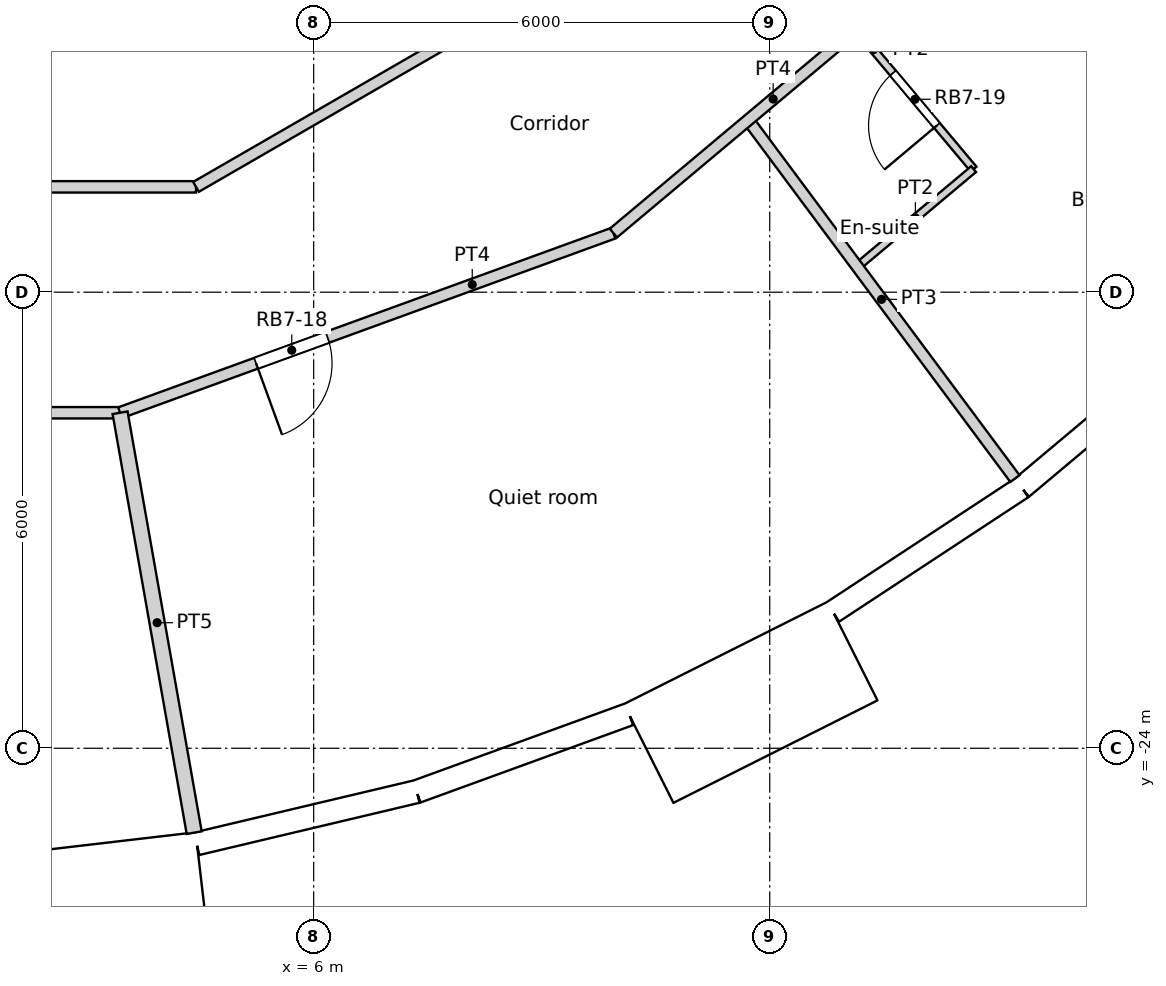
"""IFC4 building model, lengths in metres.
Left out: names, types, materials, properties, quantities, classifications, styles, units other than length and angle.
Written with IfcOpenShell. Run it as: python <this file> out.ifc"""

import sys

from ifc_helpers import new_model, si_unit, direction, frame, frame_2d, origin, origin_2d, place, context, subcontext, project, spatial, rectangle, circle, extrude, element, fill, save


model = new_model("IFC4")
c1 = context("Model", 3, precision=1e-05, world=origin(), true_north=direction((0.0, 1.0)))
c2 = subcontext(c1, "Body", "Model", "MODEL_VIEW")
j1 = project(units=[si_unit("LENGTHUNIT", "METRE"), si_unit("PLANEANGLEUNIT", "RADIAN")], contexts=[c1])
p1 = place(None, origin())
s1 = spatial("IfcSite", under=j1, at=p1, CompositionType="ELEMENT")
p2 = place(p1, origin())
s2 = spatial("IfcBuilding", under=s1, at=p2, CompositionType="ELEMENT")
p3 = place(p2, frame((0.0, 0.0, 190.8)))
s3 = spatial("IfcBuildingStorey", under=s2, at=p3, CompositionType="ELEMENT", Elevation=190.8)
for number, where, z_axis, x_axis in (
    (1, (4.263, -24.175, 0.0), (0.0, 0.0, 1.0), (1.0, 0.0, 0.0)),
    (2, (9.723, -22.54, 0.0), (0.0, 0.0, 1.0), (1.0, 0.0, 0.0)),
    (3, (14.659, -19.69, 0.0), (0.0, 0.0, 1.0), (1.0, 0.0, 0.0)),
):
    element("IfcColumn", number, at=place(p3, frame(where, z_axis=z_axis, x_axis=x_axis)), inside=s3, PredefinedType="COLUMN", context=c2, shape_type="SweptSolid", body=[
        extrude(circle(Radius=0.6, at=origin_2d()), origin(), (0.0, 0.0, 1.0), 3.6),
    ])
for number, where, z_axis, x_axis in (
    (4, (6.876, -17.521, 0.0), (0.0, 0.0, 1.0), (1.0, 0.0, 0.0)),
    (5, (11.735, -14.716, 0.0), (0.0, 0.0, 1.0), (1.0, 0.0, 0.0)),
):
    element("IfcColumn", number, at=place(p3, frame(where, z_axis=z_axis, x_axis=x_axis)), inside=s3, PredefinedType="COLUMN", context=c2, shape_type="SweptSolid", body=[
        extrude(circle(Radius=0.65, at=origin_2d()), origin(), (0.0, 0.0, 1.0), 3.6),
    ])
p4 = place(p3, frame((1.549, -26.176, -0.3), z_axis=(0.0, 0.0, 1.0), x_axis=(0.9932342274, 0.116128246006, 0.0)))
e6 = element("IfcWall", 6, at=p4, inside=s3, PredefinedType="ELEMENTEDWALL", context=c2, shape_type="SweptSolid", body=[
    extrude(rectangle(XDim=3.0, YDim=1.45, at=frame_2d((1.5, 0.0))), origin(), (0.0, 0.0, 1.0), 3.6),
])
p5 = place(p4, frame((1.5, 0.0, 1.85)))
e7 = element("IfcOpeningElement", 7, at=p5, cuts=e6, PredefinedType="OPENING", context=c2, shape_type="SweptSolid", body=[
    extrude(circle(Radius=0.9, at=origin_2d()), frame((0.0, 0.735, 0.0), z_axis=(0.0, -1.0, 0.0), x_axis=(1.0, 0.0, 0.0)), (0.0, 0.0, 1.0), 1.47),
])
p6 = place(p3, frame((4.463, -25.256, 0.0), z_axis=(0.0, 0.0, 1.0), x_axis=(0.973045378923, 0.230613725862, 0.0)))
e8 = element("IfcWall", 8, at=p6, inside=s3, PredefinedType="SOLIDWALL", context=c2, shape_type="SweptSolid", body=[
    extrude(rectangle(XDim=2.973, YDim=0.3, at=frame_2d((1.486, 0.0))), origin(), (0.0, 0.0, 1.0), 2.8),
])
p7 = place(p6, frame((1.486, 0.0, 1.55)))
e9 = element("IfcOpeningElement", 9, at=p7, cuts=e8, PredefinedType="OPENING", context=c2, shape_type="SweptSolid", body=[
    extrude(circle(Radius=0.9, at=origin_2d()), frame((0.0, 0.16, 0.0), z_axis=(0.0, -1.0, 0.0), x_axis=(1.0, 0.0, 0.0)), (0.0, 0.0, 1.0), 0.32),
])
p8 = place(p3, frame((7.356, -24.57, 0.0), z_axis=(0.0, 0.0, 1.0), x_axis=(0.939690282133, 0.342026568652, 0.0)))
e10 = element("IfcWall", 10, at=p8, inside=s3, PredefinedType="SOLIDWALL", context=c2, shape_type="SweptSolid", body=[
    extrude(rectangle(XDim=2.973, YDim=0.3, at=frame_2d((1.486, 0.0))), origin(), (0.0, 0.0, 1.0), 3.3),
])
p9 = place(p8, frame((1.486, 0.0, 1.55)))
e11 = element("IfcOpeningElement", 11, at=p9, cuts=e10, PredefinedType="OPENING", context=c2, shape_type="SweptSolid", body=[
    extrude(circle(Radius=0.9, at=origin_2d()), frame((0.0, 0.16, 0.0), z_axis=(0.0, -1.0, 0.0), x_axis=(1.0, 0.0, 0.0)), (0.0, 0.0, 1.0), 0.32),
])
p10 = place(p3, frame((10.409, -24.068, -0.3), z_axis=(0.0, 0.0, 1.0), x_axis=(0.893628249713, 0.448807922518, 0.0)))
e12 = element("IfcWall", 12, at=p10, inside=s3, PredefinedType="ELEMENTEDWALL", context=c2, shape_type="SweptSolid", body=[
    extrude(rectangle(XDim=3.0, YDim=1.45, at=frame_2d((1.5, 0.0))), origin(), (0.0, 0.0, 1.0), 3.6),
])
p11 = place(p10, frame((1.5, 0.0, 1.85)))
e13 = element("IfcOpeningElement", 13, at=p11, cuts=e12, PredefinedType="OPENING", context=c2, shape_type="SweptSolid", body=[
    extrude(circle(Radius=0.9, at=origin_2d()), frame((0.0, 0.735, 0.0), z_axis=(0.0, -1.0, 0.0), x_axis=(1.0, 0.0, 0.0)), (0.0, 0.0, 1.0), 1.47),
])
p12 = place(p3, frame((12.832, -22.206, 0.0), z_axis=(0.0, 0.0, 1.0), x_axis=(0.835508361394, 0.54947773207, 0.0)))
e14 = element("IfcWall", 14, at=p12, inside=s3, PredefinedType="SOLIDWALL", context=c2, shape_type="SweptSolid", body=[
    extrude(rectangle(XDim=2.973, YDim=0.3, at=frame_2d((1.486, 0.0))), origin(), (0.0, 0.0, 1.0), 2.8),
])
p13 = place(p12, frame((1.486, 0.0, 1.55)))
e15 = element("IfcOpeningElement", 15, at=p13, cuts=e14, PredefinedType="OPENING", context=c2, shape_type="SweptSolid", body=[
    extrude(circle(Radius=0.9, at=origin_2d()), frame((0.0, 0.16, 0.0), z_axis=(0.0, -1.0, 0.0), x_axis=(1.0, 0.0, 0.0)), (0.0, 0.0, 1.0), 0.32),
])
p14 = place(p3, frame((15.316, -20.573, 0.0), z_axis=(0.0, 0.0, 1.0), x_axis=(0.766008913364, 0.642829950023, 0.0)))
e16 = element("IfcWall", 16, at=p14, inside=s3, PredefinedType="SOLIDWALL", context=c2, shape_type="SweptSolid", body=[
    extrude(rectangle(XDim=2.973, YDim=0.3, at=frame_2d((1.486, 0.0))), origin(), (0.0, 0.0, 1.0), 3.3),
])
p15 = place(p14, frame((1.486, 0.0, 1.55)))
e17 = element("IfcOpeningElement", 17, at=p15, cuts=e16, PredefinedType="OPENING", context=c2, shape_type="SweptSolid", body=[
    extrude(circle(Radius=0.9, at=origin_2d()), frame((0.0, 0.16, 0.0), z_axis=(0.0, -1.0, 0.0), x_axis=(1.0, 0.0, 0.0)), (0.0, 0.0, 1.0), 0.32),
])
p16 = place(p3, frame((9.943, -17.222, 0.0), z_axis=(0.0, 0.0, 1.0), x_axis=(0.766192104565, 0.642611592567, 0.0)))
e18 = element("IfcWall", 18, at=p16, inside=s3, PredefinedType="PARTITIONING", context=c2, shape_type="SweptSolid", body=[
    extrude(rectangle(XDim=6.906, YDim=0.15, at=frame_2d((3.453, 0.0))), origin(), (0.0, 0.0, 1.0), 3.3),
])
p17 = place(p16, frame((5.537, 0.0, 0.0)))
e19 = element("IfcOpeningElement", 19, at=p17, cuts=e18, PredefinedType="OPENING", context=c2, shape_type="SweptSolid", body=[
    extrude(rectangle(XDim=1.0, YDim=2.1, at=frame_2d((0.5, 1.05))), frame((0.0, 0.075, 0.0), z_axis=(0.0, -1.0, 0.0), x_axis=(1.0, 0.0, 0.0)), (0.0, 0.0, 1.0), 0.15),
])
p18 = place(p3, frame((-3.021, -16.614, 0.0), z_axis=(0.0, 0.0, 1.0), x_axis=(1.0, 0.0, 0.0)))
e20 = element("IfcWall", 20, at=p18, inside=s3, PredefinedType="PARTITIONING", context=c2, shape_type="SweptSolid", body=[
    extrude(rectangle(XDim=7.473, YDim=0.15, at=frame_2d((3.736, 0.0))), origin(), (0.0, 0.0, 1.0), 3.3),
])
p19 = place(p3, frame((4.452, -16.614, 0.0), z_axis=(0.0, 0.0, 1.0), x_axis=(0.866005203721, 0.500034985904, 0.0)))
e21 = element("IfcWall", 21, at=p19, inside=s3, PredefinedType="PARTITIONING", context=c2, shape_type="SweptSolid", body=[
    extrude(rectangle(XDim=8.903, YDim=0.15, at=frame_2d((4.452, 0.0))), origin(), (0.0, 0.0, 1.0), 3.3),
])
p20 = place(p3, frame((-3.453, -19.586, 0.0), z_axis=(0.0, 0.0, 1.0), x_axis=(1.0, 0.0, 0.0)))
e22 = element("IfcWall", 22, at=p20, inside=s3, PredefinedType="PARTITIONING", context=c2, shape_type="SweptSolid", body=[
    extrude(rectangle(XDim=6.906, YDim=0.15, at=frame_2d((3.453, 0.0))), origin(), (0.0, 0.0, 1.0), 3.3),
])
p21 = place(p3, frame((3.453, -19.586, 0.0), z_axis=(0.0, 0.0, 1.0), x_axis=(0.939672634566, 0.342075050021, 0.0)))
e23 = element("IfcWall", 23, at=p21, inside=s3, PredefinedType="PARTITIONING", context=c2, shape_type="SweptSolid", body=[
    extrude(rectangle(XDim=6.908, YDim=0.15, at=frame_2d((3.454, 0.0))), origin(), (0.0, 0.0, 1.0), 3.3),
])
p22 = place(p21, frame((1.904, 0.0, 0.0)))
e24 = element("IfcOpeningElement", 24, at=p22, cuts=e23, PredefinedType="OPENING", context=c2, shape_type="SweptSolid", body=[
    extrude(rectangle(XDim=1.0, YDim=2.04, at=frame_2d((0.5, 1.02))), frame((0.0, 0.075, 0.0), z_axis=(0.0, -1.0, 0.0), x_axis=(1.0, 0.0, 0.0)), (0.0, 0.0, 1.0), 0.15),
])
p23 = place(p3, frame((3.453, -19.586, 0.0), z_axis=(0.0, 0.0, 1.0), x_axis=(0.17382754149, -0.984776109489, 0.0)))
e25 = element("IfcWall", 25, at=p23, inside=s3, PredefinedType="PARTITIONING", context=c2, shape_type="SweptSolid", body=[
    extrude(rectangle(XDim=5.61, YDim=0.2, at=frame_2d((2.805, 0.0))), origin(), (0.0, 0.0, 1.0), 3.3),
])
p24 = place(p3, frame((11.717, -15.736, 0.0), z_axis=(0.0, 0.0, 1.0), x_axis=(0.597012012598, -0.802232296043, 0.0)))
e26 = element("IfcWall", 26, at=p24, inside=s3, PredefinedType="PARTITIONING", context=c2, shape_type="SweptSolid", body=[
    extrude(rectangle(XDim=5.878, YDim=0.15, at=frame_2d((2.939, 0.0))), origin(), (0.0, 0.0, 1.0), 3.3),
])
p25 = place(p3, frame((13.151, -17.665, 0.0), z_axis=(0.0, 0.0, 1.0), x_axis=(0.766224532916, 0.642572925945, 0.0)))
e27 = element("IfcWall", 27, at=p25, inside=s3, PredefinedType="PARTITIONING", context=c2, shape_type="SweptSolid", body=[
    extrude(rectangle(XDim=1.998, YDim=0.1, at=frame_2d((0.999, 0.0))), origin(), (0.0, 0.0, 1.0), 3.3),
])
p26 = place(p3, frame((13.139, -14.542, 0.0), z_axis=(0.0, 0.0, 1.0), x_axis=(0.642731657745, -0.766091388891, 0.0)))
e28 = element("IfcWall", 28, at=p26, inside=s3, PredefinedType="PARTITIONING", context=c2, shape_type="SweptSolid", body=[
    extrude(rectangle(XDim=2.401, YDim=0.1, at=frame_2d((1.2, 0.0))), origin(), (0.0, 0.0, 1.0), 3.3),
])
p27 = place(p26, frame((0.75, 0.0, 0.0)))
e29 = element("IfcOpeningElement", 29, at=p27, cuts=e28, PredefinedType="OPENING", context=c2, shape_type="SweptSolid", body=[
    extrude(rectangle(XDim=0.9, YDim=2.04, at=frame_2d((0.45, 1.02))), frame((0.0, 0.05, 0.0), z_axis=(0.0, -1.0, 0.0), x_axis=(1.0, 0.0, 0.0)), (0.0, 0.0, 1.0), 0.1),
])
p28 = place(p3, frame((15.234, -12.785, 0.0), z_axis=(0.0, 0.0, 1.0), x_axis=(0.766230257274, -0.642566099976, 0.0)))
e30 = element("IfcWall", 30, at=p28, inside=s3, PredefinedType="PARTITIONING", context=c2, shape_type="SweptSolid", body=[
    extrude(rectangle(XDim=5.609, YDim=0.15, at=frame_2d((2.804, 0.0))), origin(), (0.0, 0.0, 1.0), 3.3),
])
p29 = place(p5, origin())
e31 = element("IfcWindow", 31, at=p29, inside=s3, PartitioningType="SINGLE_PANEL", PredefinedType="WINDOW", context=c2, shape_type="SweptSolid", body=[
    extrude(circle(Radius=0.9, at=origin_2d()), frame((0.0, 0.695, 0.0), z_axis=(0.0, -1.0, 0.0), x_axis=(1.0, 0.0, 0.0)), (0.0, 0.0, 1.0), 0.1),
])
fill(e7, e31)
p30 = place(p7, origin())
e32 = element("IfcWindow", 32, at=p30, inside=s3, PartitioningType="SINGLE_PANEL", PredefinedType="WINDOW", context=c2, shape_type="SweptSolid", body=[
    extrude(circle(Radius=0.9, at=origin_2d()), frame((0.0, 0.12, 0.0), z_axis=(0.0, -1.0, 0.0), x_axis=(1.0, 0.0, 0.0)), (0.0, 0.0, 1.0), 0.1),
])
fill(e9, e32)
p31 = place(p9, origin())
e33 = element("IfcWindow", 33, at=p31, inside=s3, PartitioningType="SINGLE_PANEL", PredefinedType="WINDOW", context=c2, shape_type="SweptSolid", body=[
    extrude(circle(Radius=0.9, at=origin_2d()), frame((0.0, 0.12, 0.0), z_axis=(0.0, -1.0, 0.0), x_axis=(1.0, 0.0, 0.0)), (0.0, 0.0, 1.0), 0.1),
])
fill(e11, e33)
p32 = place(p11, origin())
e34 = element("IfcWindow", 34, at=p32, inside=s3, PartitioningType="SINGLE_PANEL", PredefinedType="WINDOW", context=c2, shape_type="SweptSolid", body=[
    extrude(circle(Radius=0.9, at=origin_2d()), frame((0.0, 0.695, 0.0), z_axis=(0.0, -1.0, 0.0), x_axis=(1.0, 0.0, 0.0)), (0.0, 0.0, 1.0), 0.1),
])
fill(e13, e34)
p33 = place(p13, origin())
e35 = element("IfcWindow", 35, at=p33, inside=s3, PartitioningType="SINGLE_PANEL", PredefinedType="WINDOW", context=c2, shape_type="SweptSolid", body=[
    extrude(circle(Radius=0.9, at=origin_2d()), frame((0.0, 0.12, 0.0), z_axis=(0.0, -1.0, 0.0), x_axis=(1.0, 0.0, 0.0)), (0.0, 0.0, 1.0), 0.1),
])
fill(e15, e35)
p34 = place(p15, origin())
e36 = element("IfcWindow", 36, at=p34, inside=s3, PartitioningType="SINGLE_PANEL", PredefinedType="WINDOW", context=c2, shape_type="SweptSolid", body=[
    extrude(circle(Radius=0.9, at=origin_2d()), frame((0.0, 0.12, 0.0), z_axis=(0.0, -1.0, 0.0), x_axis=(1.0, 0.0, 0.0)), (0.0, 0.0, 1.0), 0.1),
])
fill(e17, e36)
p35 = place(p22, origin())
e37 = element("IfcDoor", 37, at=p35, inside=s3, OperationType="SINGLE_SWING_RIGHT", PredefinedType="DOOR", context=c2, shape_type="SweptSolid", body=[
    extrude(rectangle(XDim=1.0, YDim=2.04, at=frame_2d((0.5, 1.02))), frame((0.0, 0.025, 0.0), z_axis=(0.0, -1.0, 0.0), x_axis=(1.0, 0.0, 0.0)), (0.0, 0.0, 1.0), 0.05),
])
fill(e24, e37)
p36 = place(p27, origin())
e38 = element("IfcDoor", 38, at=p36, inside=s3, OperationType="SINGLE_SWING_LEFT", PredefinedType="DOOR", context=c2, shape_type="SweptSolid", body=[
    extrude(rectangle(XDim=0.9, YDim=2.04, at=frame_2d((0.45, 1.02))), frame((0.0, 0.025, 0.0), z_axis=(0.0, -1.0, 0.0), x_axis=(1.0, 0.0, 0.0)), (0.0, 0.0, 1.0), 0.05),
])
fill(e29, e38)
save(model, sys.argv[1])
